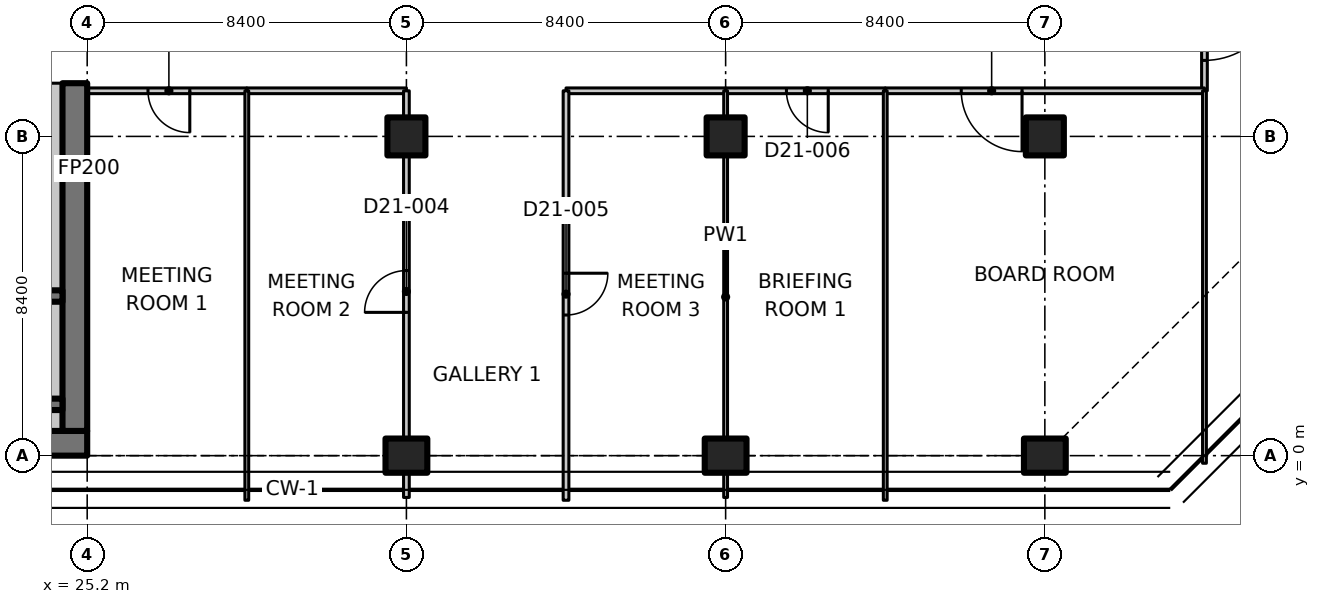
"""IFC4 building model, lengths in metres.
Left out: names, types, materials, properties, quantities, classifications, styles, units other than length and angle.
Written with IfcOpenShell. Run it as: python <this file> out.ifc"""

import sys

from ifc_helpers import new_model, si_unit, direction, frame, frame_2d, origin, origin_2d, place, context, subcontext, project, spatial, polyline, rectangle, outline, extrude, element, fill, save


model = new_model("IFC4")
c1 = context("Model", 3, precision=1e-05, world=origin(), true_north=direction((0.0, 1.0)))
c2 = subcontext(c1, "Body", "Model", "MODEL_VIEW")
j1 = project(units=[si_unit("LENGTHUNIT", "METRE"), si_unit("PLANEANGLEUNIT", "RADIAN")], contexts=[c1])
p1 = place(None, origin())
s1 = spatial("IfcSite", under=j1, at=p1, CompositionType="ELEMENT")
p2 = place(p1, origin())
s2 = spatial("IfcBuilding", under=s1, at=p2, CompositionType="ELEMENT")
p3 = place(p2, frame((0.0, 0.0, 174.0)))
s3 = spatial("IfcBuildingStorey", under=s2, at=p3, CompositionType="ELEMENT", Elevation=174.0)
p4 = place(p3, frame((33.6, 0.0, 0.0), z_axis=(0.0, 0.0, 1.0), x_axis=(0.0, 1.0, 0.0)))
e1 = element("IfcColumn", 1, at=p4, inside=s3, PredefinedType="COLUMN", context=c2, shape_type="SweptSolid", body=[
    extrude(rectangle(XDim=0.9, YDim=1.1, at=origin_2d()), origin(), (0.0, 0.0, 1.0), 3.35),
])
p5 = place(p3, frame((33.6, 8.4, 0.0), z_axis=(0.0, 0.0, 1.0), x_axis=(1.0, 0.0, 0.0)))
e2 = element("IfcColumn", 2, at=p5, inside=s3, PredefinedType="COLUMN", context=c2, shape_type="SweptSolid", body=[
    extrude(rectangle(XDim=1.0, YDim=1.0, at=origin_2d()), origin(), (0.0, 0.0, 1.0), 3.35),
])
p6 = place(p3, frame((42.0, 0.0, 0.0), z_axis=(0.0, 0.0, 1.0), x_axis=(0.0, 1.0, 0.0)))
e3 = element("IfcColumn", 3, at=p6, inside=s3, PredefinedType="COLUMN", context=c2, shape_type="SweptSolid", body=[
    extrude(rectangle(XDim=0.9, YDim=1.1, at=origin_2d()), origin(), (0.0, 0.0, 1.0), 3.35),
])
p7 = place(p3, frame((42.0, 8.4, 0.0), z_axis=(0.0, 0.0, 1.0), x_axis=(1.0, 0.0, 0.0)))
e4 = element("IfcColumn", 4, at=p7, inside=s3, PredefinedType="COLUMN", context=c2, shape_type="SweptSolid", body=[
    extrude(rectangle(XDim=1.0, YDim=1.0, at=origin_2d()), origin(), (0.0, 0.0, 1.0), 3.35),
])
p8 = place(p3, frame((50.4, 0.0, 0.0), z_axis=(0.0, 0.0, 1.0), x_axis=(0.0, 1.0, 0.0)))
e5 = element("IfcColumn", 5, at=p8, inside=s3, PredefinedType="COLUMN", context=c2, shape_type="SweptSolid", body=[
    extrude(rectangle(XDim=0.9, YDim=1.1, at=origin_2d()), origin(), (0.0, 0.0, 1.0), 3.35),
])
p9 = place(p3, frame((50.4, 8.4, 0.0), z_axis=(0.0, 0.0, 1.0), x_axis=(1.0, 0.0, 0.0)))
e6 = element("IfcColumn", 6, at=p9, inside=s3, PredefinedType="COLUMN", context=c2, shape_type="SweptSolid", body=[
    extrude(rectangle(XDim=1.0, YDim=1.0, at=origin_2d()), origin(), (0.0, 0.0, 1.0), 3.35),
])
p10 = place(p3, frame((7.286, 0.325, 0.0), z_axis=(0.0, 0.0, 1.0), x_axis=(1.0, 0.0, 0.0)))
e7 = element("IfcWall", 7, at=p10, inside=s3, PredefinedType="SHEAR", context=c2, shape_type="SweptSolid", body=[
    extrude(rectangle(XDim=17.914, YDim=0.65, at=frame_2d((8.957, 0.0))), origin(), (0.0, 0.0, 1.0), 3.35),
])
p11 = place(p3, frame((24.875, 0.65, 0.0), z_axis=(0.0, 0.0, 1.0), x_axis=(0.0, 1.0, 0.0)))
e8 = element("IfcWall", 8, at=p11, inside=s3, PredefinedType="SHEAR", context=c2, shape_type="SweptSolid", body=[
    extrude(rectangle(XDim=9.15, YDim=0.65, at=frame_2d((4.575, 0.0))), origin(), (0.0, 0.0, 1.0), 3.35),
])
p12 = place(p3, frame((15.8, 1.35, 0.0), z_axis=(0.0, 0.0, 1.0), x_axis=(1.0, 0.0, 0.0)))
e9 = element("IfcWall", 9, at=p12, inside=s3, PredefinedType="SHEAR", context=c2, shape_type="SweptSolid", body=[
    extrude(rectangle(XDim=8.75, YDim=0.3, at=frame_2d((4.375, 0.0))), origin(), (0.0, 0.0, 1.0), 3.35),
])
p13 = place(p3, frame((15.8, 4.2, 0.0), z_axis=(0.0, 0.0, 1.0), x_axis=(1.0, 0.0, 0.0)))
e10 = element("IfcWall", 10, at=p13, inside=s3, PredefinedType="SHEAR", context=c2, shape_type="SweptSolid", body=[
    extrude(rectangle(XDim=8.75, YDim=0.3, at=frame_2d((4.375, 0.0))), origin(), (0.0, 0.0, 1.0), 3.35),
])
p14 = place(p13, frame((0.4, 0.0, 0.0)))
e11 = element("IfcOpeningElement", 11, at=p14, cuts=e10, PredefinedType="OPENING", context=c2, shape_type="SweptSolid", body=[
    extrude(rectangle(XDim=1.0, YDim=2.1, at=frame_2d((0.5, 1.05))), frame((0.0, 0.16, 0.0), z_axis=(0.0, -1.0, 0.0), x_axis=(1.0, 0.0, 0.0)), (0.0, 0.0, 1.0), 0.32),
])
p15 = place(p3, frame((13.35, 0.925, 0.0), z_axis=(0.0, 0.0, 1.0), x_axis=(1.0, 0.0, 0.0)))
e12 = element("IfcWall", 12, at=p15, inside=s3, PredefinedType="PARTITIONING", context=c2, shape_type="SweptSolid", body=[
    extrude(rectangle(XDim=11.2, YDim=0.55, at=frame_2d((5.6, 0.0))), origin(), (0.0, 0.0, 1.0), 3.35),
])
p16 = place(p3, frame((24.275, 1.5, 0.0), z_axis=(0.0, 0.0, 1.0), x_axis=(0.0, 1.0, 0.0)))
e13 = element("IfcWall", 13, at=p16, inside=s3, PredefinedType="PARTITIONING", context=c2, shape_type="SweptSolid", body=[
    extrude(rectangle(XDim=2.55, YDim=0.55, at=frame_2d((1.275, 0.0))), origin(), (0.0, 0.0, 1.0), 3.35),
])
p17 = place(p3, frame((24.275, 4.35, 0.0), z_axis=(0.0, 0.0, 1.0), x_axis=(0.0, 1.0, 0.0)))
e14 = element("IfcWall", 14, at=p17, inside=s3, PredefinedType="PARTITIONING", context=c2, shape_type="SweptSolid", body=[
    extrude(rectangle(XDim=5.45, YDim=0.55, at=frame_2d((2.725, 0.0))), origin(), (0.0, 0.0, 1.0), 3.35),
])
p18 = place(p3, frame((29.4, 9.6, 0.0), z_axis=(0.0, 0.0, 1.0), x_axis=(-1.0, 0.0, 0.0)))
e15 = element("IfcWall", 15, at=p18, inside=s3, PredefinedType="PARTITIONING", context=c2, shape_type="SweptSolid", body=[
    extrude(rectangle(XDim=4.2, YDim=0.15, at=frame_2d((2.1, 0.0))), origin(), (0.0, 0.0, 1.0), 3.33),
])
p19 = place(p18, frame((1.5, 0.0, 0.0)))
e16 = element("IfcOpeningElement", 16, at=p19, cuts=e15, PredefinedType="OPENING", context=c2, shape_type="SweptSolid", body=[
    extrude(rectangle(XDim=1.1, YDim=2.1, at=frame_2d((0.55, 1.05))), frame((0.0, 0.085, 0.0), z_axis=(0.0, -1.0, 0.0), x_axis=(1.0, 0.0, 0.0)), (0.0, 0.0, 1.0), 0.17),
])
p20 = place(p3, frame((54.6, 13.0, 0.0), z_axis=(0.0, 0.0, 1.0), x_axis=(0.0, -1.0, 0.0)))
e17 = element("IfcWall", 17, at=p20, inside=s3, PredefinedType="PARTITIONING", context=c2, shape_type="SweptSolid", body=[
    extrude(rectangle(XDim=3.4, YDim=0.15, at=frame_2d((1.7, 0.0))), origin(), (0.0, 0.0, 1.0), 3.33),
])
p21 = place(p20, frame((0.6, 0.0, 0.0)))
e18 = element("IfcOpeningElement", 18, at=p21, cuts=e17, PredefinedType="OPENING", context=c2, shape_type="SweptSolid", body=[
    extrude(rectangle(XDim=2.0, YDim=2.4, at=frame_2d((1.0, 1.2))), frame((0.0, 0.085, 0.0), z_axis=(0.0, -1.0, 0.0), x_axis=(1.0, 0.0, 0.0)), (0.0, 0.0, 1.0), 0.17),
])
p22 = place(p3, frame((33.6, 9.6, 0.0), z_axis=(0.0, 0.0, 1.0), x_axis=(-1.0, 0.0, 0.0)))
e19 = element("IfcWall", 19, at=p22, inside=s3, PredefinedType="PARTITIONING", context=c2, shape_type="SweptSolid", body=[
    extrude(rectangle(XDim=4.2, YDim=0.15, at=frame_2d((2.1, 0.0))), origin(), (0.0, 0.0, 1.0), 3.33),
])
p23 = place(p3, frame((42.0, 9.6, 0.0), z_axis=(0.0, 0.0, 1.0), x_axis=(-1.0, 0.0, 0.0)))
e20 = element("IfcWall", 20, at=p23, inside=s3, PredefinedType="PARTITIONING", context=c2, shape_type="SweptSolid", body=[
    extrude(rectangle(XDim=4.2, YDim=0.15, at=frame_2d((2.1, 0.0))), origin(), (0.0, 0.0, 1.0), 3.33),
])
p24 = place(p3, frame((46.2, 9.6, 0.0), z_axis=(0.0, 0.0, 1.0), x_axis=(-1.0, 0.0, 0.0)))
e21 = element("IfcWall", 21, at=p24, inside=s3, PredefinedType="PARTITIONING", context=c2, shape_type="SweptSolid", body=[
    extrude(rectangle(XDim=4.2, YDim=0.15, at=frame_2d((2.1, 0.0))), origin(), (0.0, 0.0, 1.0), 3.33),
])
p25 = place(p24, frame((1.5, 0.0, 0.0)))
e22 = element("IfcOpeningElement", 22, at=p25, cuts=e21, PredefinedType="OPENING", context=c2, shape_type="SweptSolid", body=[
    extrude(rectangle(XDim=1.1, YDim=2.1, at=frame_2d((0.55, 1.05))), frame((0.0, 0.085, 0.0), z_axis=(0.0, -1.0, 0.0), x_axis=(1.0, 0.0, 0.0)), (0.0, 0.0, 1.0), 0.17),
])
p26 = place(p3, frame((54.6, 9.6, 0.0), z_axis=(0.0, 0.0, 1.0), x_axis=(-1.0, 0.0, 0.0)))
e23 = element("IfcWall", 23, at=p26, inside=s3, PredefinedType="PARTITIONING", context=c2, shape_type="SweptSolid", body=[
    extrude(rectangle(XDim=8.4, YDim=0.15, at=frame_2d((4.2, 0.0))), origin(), (0.0, 0.0, 1.0), 3.33),
])
p27 = place(p26, frame((4.8, 0.0, 0.0)))
e24 = element("IfcOpeningElement", 24, at=p27, cuts=e23, PredefinedType="OPENING", context=c2, shape_type="SweptSolid", body=[
    extrude(rectangle(XDim=1.6, YDim=2.1, at=frame_2d((0.8, 1.05))), frame((0.0, 0.085, 0.0), z_axis=(0.0, -1.0, 0.0), x_axis=(1.0, 0.0, 0.0)), (0.0, 0.0, 1.0), 0.17),
])
p28 = place(p3, frame((54.6, -0.2, 0.0), z_axis=(0.0, 0.0, 1.0), x_axis=(0.0, 1.0, 0.0)))
e25 = element("IfcWall", 25, at=p28, inside=s3, PredefinedType="PARTITIONING", context=c2, shape_type="SweptSolid", body=[
    extrude(outline(polyline([(0.0, 0.0), (9.8, 0.0), (9.8, 3.33), (5.066, 3.33), (5.064, 2.98), (3.736, 2.98), (3.734, 3.33), (0.0, 3.33), (0.0, 0.0)])), frame((0.0, 0.05, 0.0), z_axis=(0.0, -1.0, 0.0), x_axis=(1.0, 0.0, 0.0)), (0.0, 0.0, 1.0), 0.1),
])
p29 = place(p3, frame((33.6, -1.1, 0.0), z_axis=(0.0, 0.0, 1.0), x_axis=(0.0, 1.0, 0.0)))
e26 = element("IfcWall", 26, at=p29, inside=s3, PredefinedType="PARTITIONING", context=c2, shape_type="SweptSolid", body=[
    extrude(rectangle(XDim=0.63, YDim=0.15, at=frame_2d((0.315, 0.0))), origin(), (0.0, 0.0, 1.0), 3.33),
])
p30 = place(p3, frame((33.6, 0.47, 0.0), z_axis=(0.0, 0.0, 1.0), x_axis=(0.0, 1.0, 0.0)))
e27 = element("IfcWall", 27, at=p30, inside=s3, PredefinedType="PARTITIONING", context=c2, shape_type="SweptSolid", body=[
    extrude(rectangle(XDim=7.41, YDim=0.15, at=frame_2d((3.705, 0.0))), origin(), (0.0, 0.0, 1.0), 3.33),
])
p31 = place(p30, frame((3.3, 0.0, 0.0)))
e28 = element("IfcOpeningElement", 28, at=p31, cuts=e27, PredefinedType="OPENING", context=c2, shape_type="SweptSolid", body=[
    extrude(rectangle(XDim=1.1, YDim=2.1, at=frame_2d((0.55, 1.05))), frame((0.0, 0.085, 0.0), z_axis=(0.0, -1.0, 0.0), x_axis=(1.0, 0.0, 0.0)), (0.0, 0.0, 1.0), 0.17),
])
p32 = place(p3, frame((33.6, 8.92, 0.0), z_axis=(0.0, 0.0, 1.0), x_axis=(0.0, 1.0, 0.0)))
e29 = element("IfcWall", 29, at=p32, inside=s3, PredefinedType="PARTITIONING", context=c2, shape_type="SweptSolid", body=[
    extrude(rectangle(XDim=0.68, YDim=0.15, at=frame_2d((0.34, 0.0))), origin(), (0.0, 0.0, 1.0), 3.33),
])
p33 = place(p3, frame((37.8, 9.6, 0.0), z_axis=(0.0, 0.0, 1.0), x_axis=(0.0, -1.0, 0.0)))
e30 = element("IfcWall", 30, at=p33, inside=s3, PredefinedType="PARTITIONING", context=c2, shape_type="SweptSolid", body=[
    extrude(outline(polyline([(0.0, 0.0), (10.774, 0.0), (10.774, 3.33), (10.7, 3.33), (10.05, 3.33), (10.048, 2.98), (9.152, 2.98), (9.15, 3.33), (0.0, 3.33), (0.0, 0.0)])), frame((0.0, 0.075, 0.0), z_axis=(0.0, -1.0, 0.0), x_axis=(1.0, 0.0, 0.0)), (0.0, 0.0, 1.0), 0.15),
])
p34 = place(p33, frame((4.8, 0.0, 0.0)))
e31 = element("IfcOpeningElement", 31, at=p34, cuts=e30, PredefinedType="OPENING", context=c2, shape_type="SweptSolid", body=[
    extrude(rectangle(XDim=1.1, YDim=2.1, at=frame_2d((0.55, 1.05))), frame((0.0, 0.085, 0.0), z_axis=(0.0, -1.0, 0.0), x_axis=(1.0, 0.0, 0.0)), (0.0, 0.0, 1.0), 0.17),
])
p35 = place(p3, frame((29.4, 9.6, 0.0), z_axis=(0.0, 0.0, 1.0), x_axis=(0.0, -1.0, 0.0)))
e32 = element("IfcWall", 32, at=p35, inside=s3, PredefinedType="PARTITIONING", context=c2, shape_type="SweptSolid", body=[
    extrude(outline(polyline([(0.0, 0.0), (10.774, 0.0), (10.774, 3.33), (10.7, 3.33), (10.05, 3.33), (10.048, 2.98), (9.152, 2.98), (9.15, 3.33), (0.0, 3.33), (0.0, 0.0)])), frame((0.0, 0.05, 0.0), z_axis=(0.0, -1.0, 0.0), x_axis=(1.0, 0.0, 0.0)), (0.0, 0.0, 1.0), 0.1),
])
p36 = place(p3, frame((42.0, 9.6, 0.0), z_axis=(0.0, 0.0, 1.0), x_axis=(0.0, -1.0, 0.0)))
e33 = element("IfcWall", 33, at=p36, inside=s3, PredefinedType="PARTITIONING", context=c2, shape_type="SweptSolid", body=[
    extrude(rectangle(XDim=0.68, YDim=0.1, at=frame_2d((0.34, 0.0))), origin(), (0.0, 0.0, 1.0), 3.33),
])
p37 = place(p3, frame((42.0, 7.88, 0.0), z_axis=(0.0, 0.0, 1.0), x_axis=(0.0, -1.0, 0.0)))
e34 = element("IfcWall", 34, at=p37, inside=s3, PredefinedType="PARTITIONING", context=c2, shape_type="SweptSolid", body=[
    extrude(rectangle(XDim=7.41, YDim=0.1, at=frame_2d((3.705, 0.0))), origin(), (0.0, 0.0, 1.0), 3.33),
])
p38 = place(p3, frame((42.0, -0.47, 0.0), z_axis=(0.0, 0.0, 1.0), x_axis=(0.0, -1.0, 0.0)))
e35 = element("IfcWall", 35, at=p38, inside=s3, PredefinedType="PARTITIONING", context=c2, shape_type="SweptSolid", body=[
    extrude(rectangle(XDim=0.63, YDim=0.1, at=frame_2d((0.315, 0.0))), origin(), (0.0, 0.0, 1.0), 3.33),
])
p39 = place(p3, frame((46.2, 9.6, 0.0), z_axis=(0.0, 0.0, 1.0), x_axis=(0.0, -1.0, 0.0)))
e36 = element("IfcWall", 36, at=p39, inside=s3, PredefinedType="PARTITIONING", context=c2, shape_type="SweptSolid", body=[
    extrude(outline(polyline([(0.0, 0.0), (10.774, 0.0), (10.774, 3.33), (10.7, 3.33), (10.05, 3.33), (10.048, 2.98), (9.152, 2.98), (9.15, 3.33), (0.0, 3.33), (0.0, 0.0)])), frame((0.0, 0.05, 0.0), z_axis=(0.0, -1.0, 0.0), x_axis=(1.0, 0.0, 0.0)), (0.0, 0.0, 1.0), 0.1),
])
p40 = place(p21, origin())
e37 = element("IfcDoor", 37, at=p40, inside=s3, OperationType="DOUBLE_DOOR_SINGLE_SWING", PredefinedType="DOOR", context=c2, shape_type="SweptSolid", body=[
    extrude(rectangle(XDim=2.0, YDim=2.4, at=frame_2d((1.0, 1.2))), frame((0.0, 0.025, 0.0), z_axis=(0.0, -1.0, 0.0), x_axis=(1.0, 0.0, 0.0)), (0.0, 0.0, 1.0), 0.05),
])
fill(e18, e37)
p41 = place(p19, origin())
e38 = element("IfcDoor", 38, at=p41, inside=s3, OperationType="SINGLE_SWING_LEFT", PredefinedType="DOOR", context=c2, shape_type="SweptSolid", body=[
    extrude(rectangle(XDim=1.1, YDim=2.1, at=frame_2d((0.55, 1.05))), frame((0.0, 0.025, 0.0), z_axis=(0.0, -1.0, 0.0), x_axis=(1.0, 0.0, 0.0)), (0.0, 0.0, 1.0), 0.05),
])
fill(e16, e38)
p42 = place(p31, origin())
e39 = element("IfcDoor", 39, at=p42, inside=s3, OperationType="SINGLE_SWING_LEFT", PredefinedType="DOOR", context=c2, shape_type="SweptSolid", body=[
    extrude(rectangle(XDim=1.1, YDim=2.1, at=frame_2d((0.55, 1.05))), frame((0.0, 0.025, 0.0), z_axis=(0.0, -1.0, 0.0), x_axis=(1.0, 0.0, 0.0)), (0.0, 0.0, 1.0), 0.05),
])
fill(e28, e39)
p43 = place(p34, origin())
e40 = element("IfcDoor", 40, at=p43, inside=s3, OperationType="SINGLE_SWING_LEFT", PredefinedType="DOOR", context=c2, shape_type="SweptSolid", body=[
    extrude(rectangle(XDim=1.1, YDim=2.1, at=frame_2d((0.55, 1.05))), frame((0.0, 0.025, 0.0), z_axis=(0.0, -1.0, 0.0), x_axis=(1.0, 0.0, 0.0)), (0.0, 0.0, 1.0), 0.05),
])
fill(e31, e40)
p44 = place(p25, origin())
e41 = element("IfcDoor", 41, at=p44, inside=s3, OperationType="SINGLE_SWING_LEFT", PredefinedType="DOOR", context=c2, shape_type="SweptSolid", body=[
    extrude(rectangle(XDim=1.1, YDim=2.1, at=frame_2d((0.55, 1.05))), frame((0.0, 0.025, 0.0), z_axis=(0.0, -1.0, 0.0), x_axis=(1.0, 0.0, 0.0)), (0.0, 0.0, 1.0), 0.05),
])
fill(e22, e41)
p45 = place(p27, origin())
e42 = element("IfcDoor", 42, at=p45, inside=s3, OperationType="DOUBLE_DOOR_SINGLE_SWING", PredefinedType="DOOR", context=c2, shape_type="SweptSolid", body=[
    extrude(rectangle(XDim=1.6, YDim=2.1, at=frame_2d((0.8, 1.05))), frame((0.0, 0.025, 0.0), z_axis=(0.0, -1.0, 0.0), x_axis=(1.0, 0.0, 0.0)), (0.0, 0.0, 1.0), 0.05),
])
fill(e24, e42)
save(model, sys.argv[1])
